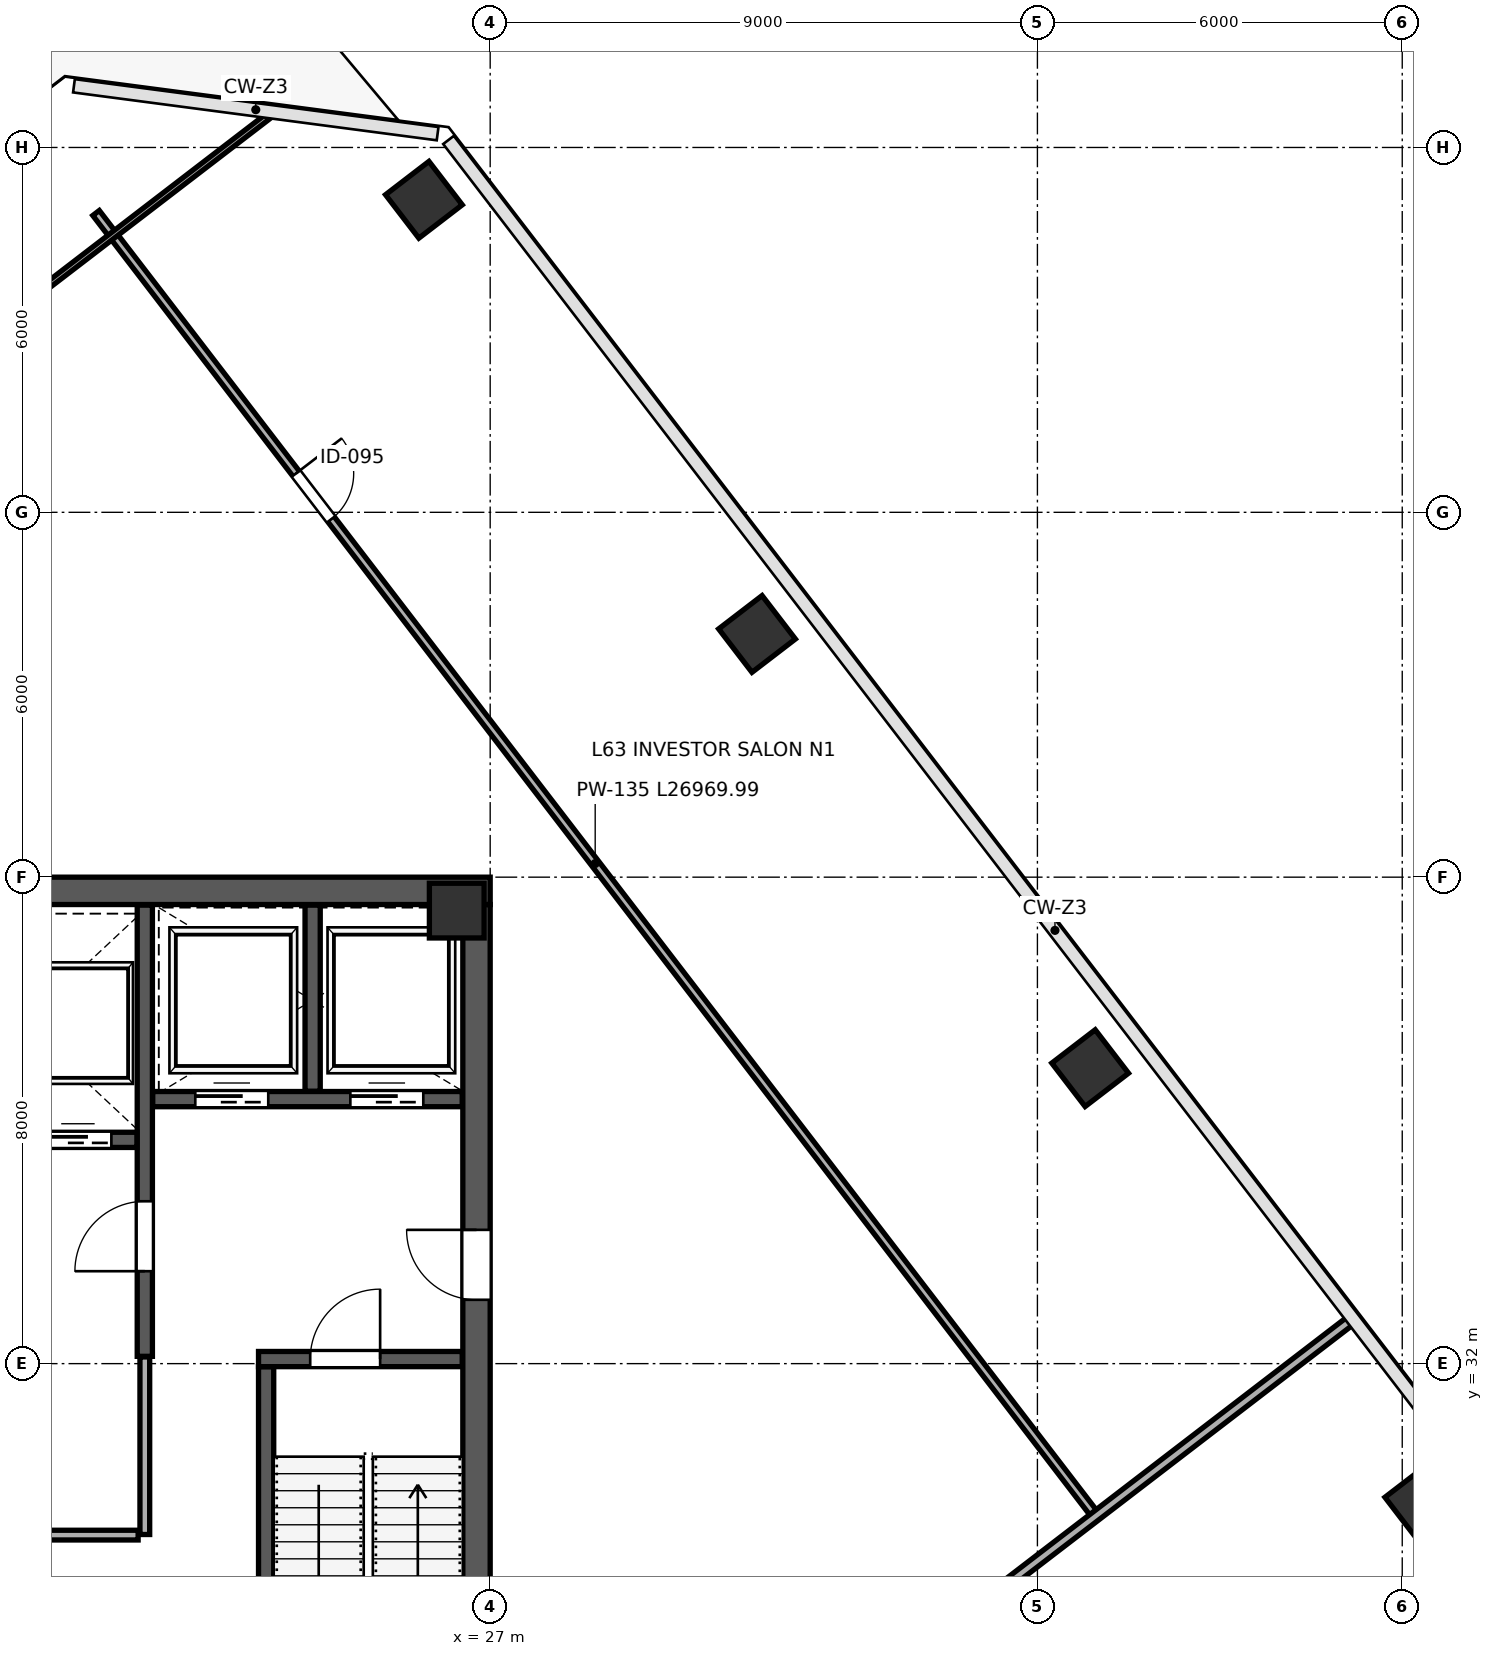
"""IFC4 building model, lengths in metres.
Left out: names, types, materials, properties, quantities, classifications, styles, units other than length and angle.
Written with IfcOpenShell. Run it as: python <this file> out.ifc"""

import sys

from ifc_helpers import new_model, si_unit, direction, frame, frame_2d, origin, origin_2d, place, context, subcontext, project, spatial, rectangle, extrude, source, transform, mapped, element, fill, save


model = new_model("IFC4")
c1 = context("Model", 3, precision=1e-05, world=origin(), true_north=direction((0.0, 1.0)))
c2 = subcontext(c1, "Body", "Model", "MODEL_VIEW")
j1 = project(units=[si_unit("LENGTHUNIT", "METRE"), si_unit("PLANEANGLEUNIT", "RADIAN")], contexts=[c1])
p1 = place(None, origin())
s1 = spatial("IfcSite", under=j1, at=p1, CompositionType="ELEMENT")
p2 = place(p1, origin())
s2 = spatial("IfcBuilding", under=s1, at=p2, CompositionType="ELEMENT")
p3 = place(p2, frame((0.0, 0.0, 279.4)))
s3 = spatial("IfcBuildingStorey", under=s2, at=p3, CompositionType="ELEMENT", Elevation=279.4)
m1 = source(origin(), c2, "Body", "SweptSolid", [
    extrude(rectangle(XDim=0.9, YDim=0.9, at=origin_2d()), origin(), (0.0, 0.0, 1.0), 4.199),
])
p4 = place(p3, frame((26.45, 39.45, 0.001), z_axis=(0.0, 0.0, 1.0), x_axis=(1.0, 0.0, 0.0)))
e1 = element("IfcColumn", 1, at=p4, inside=s3, PredefinedType="COLUMN", context=c2, shape_type="MappedRepresentation", body=[
    mapped(m1, transform((0.0, 0.0, 0.0), scale=1.0)),
])
m2 = source(origin(), c2, "Body", "SweptSolid", [
    extrude(rectangle(XDim=0.9, YDim=0.9, at=origin_2d()), origin(), (0.0, 0.0, 1.0), 4.199),
])
for number, where, z_axis, x_axis in (
    (2, (25.91, 51.14, 0.001), (0.0, 0.0, 1.0), (-0.609, 0.793, 0.0)),
    (3, (31.389, 44.0, 0.001), (0.0, 0.0, 1.0), (-0.609, 0.793, 0.0)),
    (4, (36.867, 36.859, 0.001), (0.0, 0.0, 1.0), (-0.609, 0.793, 0.0)),
    (5, (42.346, 29.719, 0.001), (0.0, 0.0, 1.0), (-0.609, 0.793, 0.0)),
):
    element("IfcColumn", number, at=place(p3, frame(where, z_axis=z_axis, x_axis=x_axis)), inside=s3, PredefinedType="COLUMN", context=c2, shape_type="MappedRepresentation", body=[
        mapped(m2, transform((0.0, 0.0, 0.0), scale=1.0)),
    ])
p5 = place(p3, frame((26.775, 24.45, 0.0), z_axis=(0.0, 0.0, 1.0), x_axis=(0.0, 1.0, 0.0)))
e6 = element("IfcWall", 6, at=p5, inside=s3, PredefinedType="SHEAR", context=c2, shape_type="SweptSolid", body=[
    extrude(rectangle(XDim=15.1, YDim=0.45, at=frame_2d((7.55, 0.0))), origin(), (0.0, 0.0, 1.0), 3.96),
])
p6 = place(p5, frame((8.6, 0.0, 0.0)))
e7 = element("IfcOpeningElement", 7, at=p6, cuts=e6, PredefinedType="OPENING", context=c2, shape_type="SweptSolid", body=[
    extrude(rectangle(XDim=1.15, YDim=2.2, at=frame_2d((0.575, 1.1))), frame((0.0, 0.235, 0.0), z_axis=(0.0, -1.0, 0.0), x_axis=(1.0, 0.0, 0.0)), (0.0, 0.0, 1.0), 0.47),
])
p7 = place(p3, frame((9.0, 39.775, 0.0), z_axis=(0.0, 0.0, 1.0), x_axis=(1.0, 0.0, 0.0)))
e8 = element("IfcWall", 8, at=p7, inside=s3, PredefinedType="SHEAR", context=c2, shape_type="SweptSolid", body=[
    extrude(rectangle(XDim=18.0, YDim=0.45, at=frame_2d((9.0, 0.0))), origin(), (0.0, 0.0, 1.0), 3.96),
])
p8 = place(p3, frame((23.315, 24.46, 0.0), z_axis=(0.0, 0.0, 1.0), x_axis=(0.0, 1.0, 0.0)))
e9 = element("IfcWall", 9, at=p8, inside=s3, PredefinedType="SHEAR", context=c2, shape_type="SweptSolid", body=[
    extrude(rectangle(XDim=7.49, YDim=0.25, at=frame_2d((3.745, 0.0))), origin(), (0.0, 0.0, 1.0), 3.96),
])
p9 = place(p3, frame((23.19, 32.075, 0.0), z_axis=(0.0, 0.0, 1.0), x_axis=(1.0, 0.0, 0.0)))
e10 = element("IfcWall", 10, at=p9, inside=s3, PredefinedType="SHEAR", context=c2, shape_type="SweptSolid", body=[
    extrude(rectangle(XDim=3.35, YDim=0.25, at=frame_2d((1.675, 0.0))), origin(), (0.0, 0.0, 1.0), 3.96),
])
p10 = place(p9, frame((0.85, 0.0, 0.0)))
e11 = element("IfcOpeningElement", 11, at=p10, cuts=e10, PredefinedType="OPENING", context=c2, shape_type="SweptSolid", body=[
    extrude(rectangle(XDim=1.15, YDim=2.2, at=frame_2d((0.575, 1.1))), frame((0.0, 0.135, 0.0), z_axis=(0.0, -1.0, 0.0), x_axis=(1.0, 0.0, 0.0)), (0.0, 0.0, 1.0), 0.27),
])
p11 = place(p3, frame((21.32, 32.12, 0.0), z_axis=(0.0, 0.0, 1.0), x_axis=(0.0, 1.0, 0.0)))
e12 = element("IfcWall", 12, at=p11, inside=s3, PredefinedType="SHEAR", context=c2, shape_type="SweptSolid", body=[
    extrude(rectangle(XDim=7.42, YDim=0.25, at=frame_2d((3.71, 0.0))), origin(), (0.0, 0.0, 1.0), 3.96),
])
p12 = place(p11, frame((1.4, 0.0, 0.0)))
e13 = element("IfcOpeningElement", 13, at=p12, cuts=e12, PredefinedType="OPENING", context=c2, shape_type="SweptSolid", body=[
    extrude(rectangle(XDim=1.15, YDim=2.2, at=frame_2d((0.575, 1.1))), frame((0.0, 0.135, 0.0), z_axis=(0.0, -1.0, 0.0), x_axis=(1.0, 0.0, 0.0)), (0.0, 0.0, 1.0), 0.27),
])
p13 = place(p3, frame((21.45, 36.35, 0.0), z_axis=(0.0, 0.0, 1.0), x_axis=(1.0, 0.0, 0.0)))
e14 = element("IfcWall", 14, at=p13, inside=s3, PredefinedType="SHEAR", context=c2, shape_type="SweptSolid", body=[
    extrude(rectangle(XDim=5.09, YDim=0.25, at=frame_2d((2.545, 0.0))), origin(), (0.0, 0.0, 1.0), 3.96),
])
p14 = place(p13, frame((0.7, 0.0, 0.0)))
e15 = element("IfcOpeningElement", 15, at=p14, cuts=e14, PredefinedType="OPENING", context=c2, shape_type="SweptSolid", body=[
    extrude(rectangle(XDim=1.2, YDim=2.2, at=frame_2d((0.6, 1.1))), frame((0.0, 0.135, 0.0), z_axis=(0.0, -1.0, 0.0), x_axis=(1.0, 0.0, 0.0)), (0.0, 0.0, 1.0), 0.27),
])
p15 = place(p13, frame((3.25, 0.0, 0.0)))
e16 = element("IfcOpeningElement", 16, at=p15, cuts=e14, PredefinedType="OPENING", context=c2, shape_type="SweptSolid", body=[
    extrude(rectangle(XDim=1.2, YDim=2.2, at=frame_2d((0.6, 1.1))), frame((0.0, 0.135, 0.0), z_axis=(0.0, -1.0, 0.0), x_axis=(1.0, 0.0, 0.0)), (0.0, 0.0, 1.0), 0.27),
])
p16 = place(p3, frame((24.08, 36.48, 0.0), z_axis=(0.0, 0.0, 1.0), x_axis=(0.0, 1.0, 0.0)))
e17 = element("IfcWall", 17, at=p16, inside=s3, PredefinedType="SHEAR", context=c2, shape_type="SweptSolid", body=[
    extrude(rectangle(XDim=3.06, YDim=0.25, at=frame_2d((1.53, 0.0))), origin(), (0.0, 0.0, 1.0), 3.96),
])
p17 = place(p3, frame((17.32, 35.68, 0.0), z_axis=(0.0, 0.0, 1.0), x_axis=(1.0, 0.0, 0.0)))
e18 = element("IfcWall", 18, at=p17, inside=s3, PredefinedType="SHEAR", context=c2, shape_type="SweptSolid", body=[
    extrude(rectangle(XDim=3.87, YDim=0.25, at=frame_2d((1.935, 0.0))), origin(), (0.0, 0.0, 1.0), 3.96),
])
p18 = place(p17, frame((0.45, 0.0, 0.0)))
e19 = element("IfcOpeningElement", 19, at=p18, cuts=e18, PredefinedType="OPENING", context=c2, shape_type="SweptSolid", body=[
    extrude(rectangle(XDim=1.1, YDim=2.2, at=frame_2d((0.55, 1.1))), frame((0.0, 0.135, 0.0), z_axis=(0.0, -1.0, 0.0), x_axis=(1.0, 0.0, 0.0)), (0.0, 0.0, 1.0), 0.27),
])
p19 = place(p17, frame((2.35, 0.0, 0.0)))
e20 = element("IfcOpeningElement", 20, at=p19, cuts=e18, PredefinedType="OPENING", context=c2, shape_type="SweptSolid", body=[
    extrude(rectangle(XDim=1.1, YDim=2.2, at=frame_2d((0.55, 1.1))), frame((0.0, 0.135, 0.0), z_axis=(0.0, -1.0, 0.0), x_axis=(1.0, 0.0, 0.0)), (0.0, 0.0, 1.0), 0.27),
])
p20 = place(p3, frame((12.84, 29.18, 0.0), z_axis=(0.0, 0.0, 1.0), x_axis=(1.0, 0.0, 0.0)))
e21 = element("IfcWall", 21, at=p20, inside=s3, PredefinedType="PARTITIONING", context=c2, shape_type="SweptSolid", body=[
    extrude(rectangle(XDim=8.37, YDim=0.16, at=frame_2d((4.185, 0.0))), origin(), (0.0, 0.0, 1.0), 3.96),
])
p21 = place(p20, frame((2.6, 0.0, 0.0)))
e22 = element("IfcOpeningElement", 22, at=p21, cuts=e21, PredefinedType="OPENING", context=c2, shape_type="SweptSolid", body=[
    extrude(rectangle(XDim=0.9, YDim=2.15, at=frame_2d((0.45, 1.075))), frame((0.0, 0.09, 0.0), z_axis=(0.0, -1.0, 0.0), x_axis=(1.0, 0.0, 0.0)), (0.0, 0.0, 1.0), 0.18),
])
p22 = place(p3, frame((21.32, 29.19, 0.0), z_axis=(0.0, 0.0, 1.0), x_axis=(0.0, 1.0, 0.0)))
e23 = element("IfcWall", 23, at=p22, inside=s3, PredefinedType="PARTITIONING", context=c2, shape_type="SweptSolid", body=[
    extrude(rectangle(XDim=2.92, YDim=0.16, at=frame_2d((1.46, 0.0))), origin(), (0.0, 0.0, 1.0), 3.96),
])
p23 = place(p3, frame((20.518, 50.922, 0.0), z_axis=(0.0, 0.0, 1.0), x_axis=(0.608759693778, -0.793354671778, 0.0)))
e24 = element("IfcWall", 24, at=p23, inside=s3, PredefinedType="PARTITIONING", context=c2, shape_type="SweptSolid", body=[
    extrude(rectangle(XDim=26.97, YDim=0.135, at=frame_2d((13.485, 0.0))), origin(), (0.0, 0.0, 1.0), 3.96),
])
p24 = place(p23, frame((5.4, 0.0, 0.0)))
e25 = element("IfcOpeningElement", 25, at=p24, cuts=e24, PredefinedType="OPENING", context=c2, shape_type="SweptSolid", body=[
    extrude(rectangle(XDim=0.95, YDim=2.15, at=frame_2d((0.475, 1.075))), frame((0.0, 0.078, 0.0), z_axis=(0.0, -1.0, 0.0), x_axis=(1.0, 0.0, 0.0)), (0.0, 0.0, 1.0), 0.155),
])
p25 = place(p3, frame((1.519, 35.764, 0.0), z_axis=(0.0, 0.0, 1.0), x_axis=(0.793353184068, 0.608761632602, 0.0)))
e26 = element("IfcWall", 26, at=p25, inside=s3, PredefinedType="PARTITIONING", context=c2, shape_type="SweptSolid", body=[
    extrude(rectangle(XDim=27.572, YDim=0.1, at=frame_2d((13.786, 0.0))), origin(), (0.0, 0.0, 1.0), 3.96),
])
p26 = place(p3, frame((25.092, 20.387, 0.0), z_axis=(0.0, 0.0, 1.0), x_axis=(0.793357014217, 0.608756641025, 0.0)))
e27 = element("IfcWall", 27, at=p26, inside=s3, PredefinedType="PARTITIONING", context=c2, shape_type="SweptSolid", body=[
    extrude(rectangle(XDim=20.24, YDim=0.16, at=frame_2d((10.12, 0.0))), origin(), (0.0, 0.0, 1.0), 3.195),
])
m3 = source(origin(), c2, "Body", "SweptSolid", [
    extrude(rectangle(XDim=1.15, YDim=2.2, at=frame_2d((0.575, 1.1))), frame((0.0, 0.025, 0.0), z_axis=(0.0, -1.0, 0.0), x_axis=(1.0, 0.0, 0.0)), (0.0, 0.0, 1.0), 0.05),
])
p27 = place(p12, origin())
e28 = element("IfcDoor", 28, at=p27, inside=s3, OperationType="SINGLE_SWING_LEFT", PredefinedType="DOOR", context=c2, shape_type="MappedRepresentation", body=[
    mapped(m3, transform((0.0, 0.0, 0.0), scale=1.0)),
])
fill(e13, e28)
m4 = source(origin(), c2, "Body", "SweptSolid", [
    extrude(rectangle(XDim=1.15, YDim=2.2, at=frame_2d((0.575, 1.1))), frame((0.0, 0.025, 0.0), z_axis=(0.0, -1.0, 0.0), x_axis=(1.0, 0.0, 0.0)), (0.0, 0.0, 1.0), 0.05),
])
p28 = place(p10, origin())
e29 = element("IfcDoor", 29, at=p28, inside=s3, OperationType="SINGLE_SWING_RIGHT", PredefinedType="DOOR", context=c2, shape_type="MappedRepresentation", body=[
    mapped(m4, transform((0.0, 0.0, 0.0), scale=1.0)),
])
fill(e11, e29)
p29 = place(p6, origin())
e30 = element("IfcDoor", 30, at=p29, inside=s3, OperationType="SINGLE_SWING_RIGHT", PredefinedType="DOOR", context=c2, shape_type="MappedRepresentation", body=[
    mapped(m3, transform((0.0, 0.0, 0.0), scale=1.0)),
])
fill(e7, e30)
m5 = source(origin(), c2, "Body", "SweptSolid", [
    extrude(rectangle(XDim=1.1, YDim=2.2, at=frame_2d((0.55, 1.1))), frame((0.0, 0.025, 0.0), z_axis=(0.0, -1.0, 0.0), x_axis=(1.0, 0.0, 0.0)), (0.0, 0.0, 1.0), 0.05),
])
p30 = place(p19, origin())
e31 = element("IfcDoor", 31, at=p30, inside=s3, OperationType="SLIDING_TO_RIGHT", PredefinedType="DOOR", context=c2, shape_type="MappedRepresentation", body=[
    mapped(m5, transform((0.0, 0.0, 0.0), scale=1.0)),
])
fill(e20, e31)
m6 = source(origin(), c2, "Body", "SweptSolid", [
    extrude(rectangle(XDim=1.2, YDim=2.2, at=frame_2d((0.6, 1.1))), frame((0.0, 0.025, 0.0), z_axis=(0.0, -1.0, 0.0), x_axis=(1.0, 0.0, 0.0)), (0.0, 0.0, 1.0), 0.05),
])
p31 = place(p14, origin())
e32 = element("IfcDoor", 32, at=p31, inside=s3, OperationType="SLIDING_TO_LEFT", PredefinedType="DOOR", context=c2, shape_type="MappedRepresentation", body=[
    mapped(m6, transform((0.0, 0.0, 0.0), scale=1.0)),
])
fill(e15, e32)
p32 = place(p15, origin())
e33 = element("IfcDoor", 33, at=p32, inside=s3, OperationType="SLIDING_TO_RIGHT", PredefinedType="DOOR", context=c2, shape_type="MappedRepresentation", body=[
    mapped(m6, transform((0.0, 0.0, 0.0), scale=1.0)),
])
fill(e16, e33)
m7 = source(origin(), c2, "Body", "SweptSolid", [
    extrude(rectangle(XDim=0.95, YDim=2.15, at=frame_2d((0.475, 1.075))), frame((0.0, 0.025, 0.0), z_axis=(0.0, -1.0, 0.0), x_axis=(1.0, 0.0, 0.0)), (0.0, 0.0, 1.0), 0.05),
])
p33 = place(p24, origin())
e34 = element("IfcDoor", 34, at=p33, inside=s3, OperationType="SINGLE_SWING_LEFT", PredefinedType="DOOR", context=c2, shape_type="MappedRepresentation", body=[
    mapped(m7, transform((0.0, 0.0, 0.0), scale=1.0)),
])
fill(e25, e34)
save(model, sys.argv[1])
